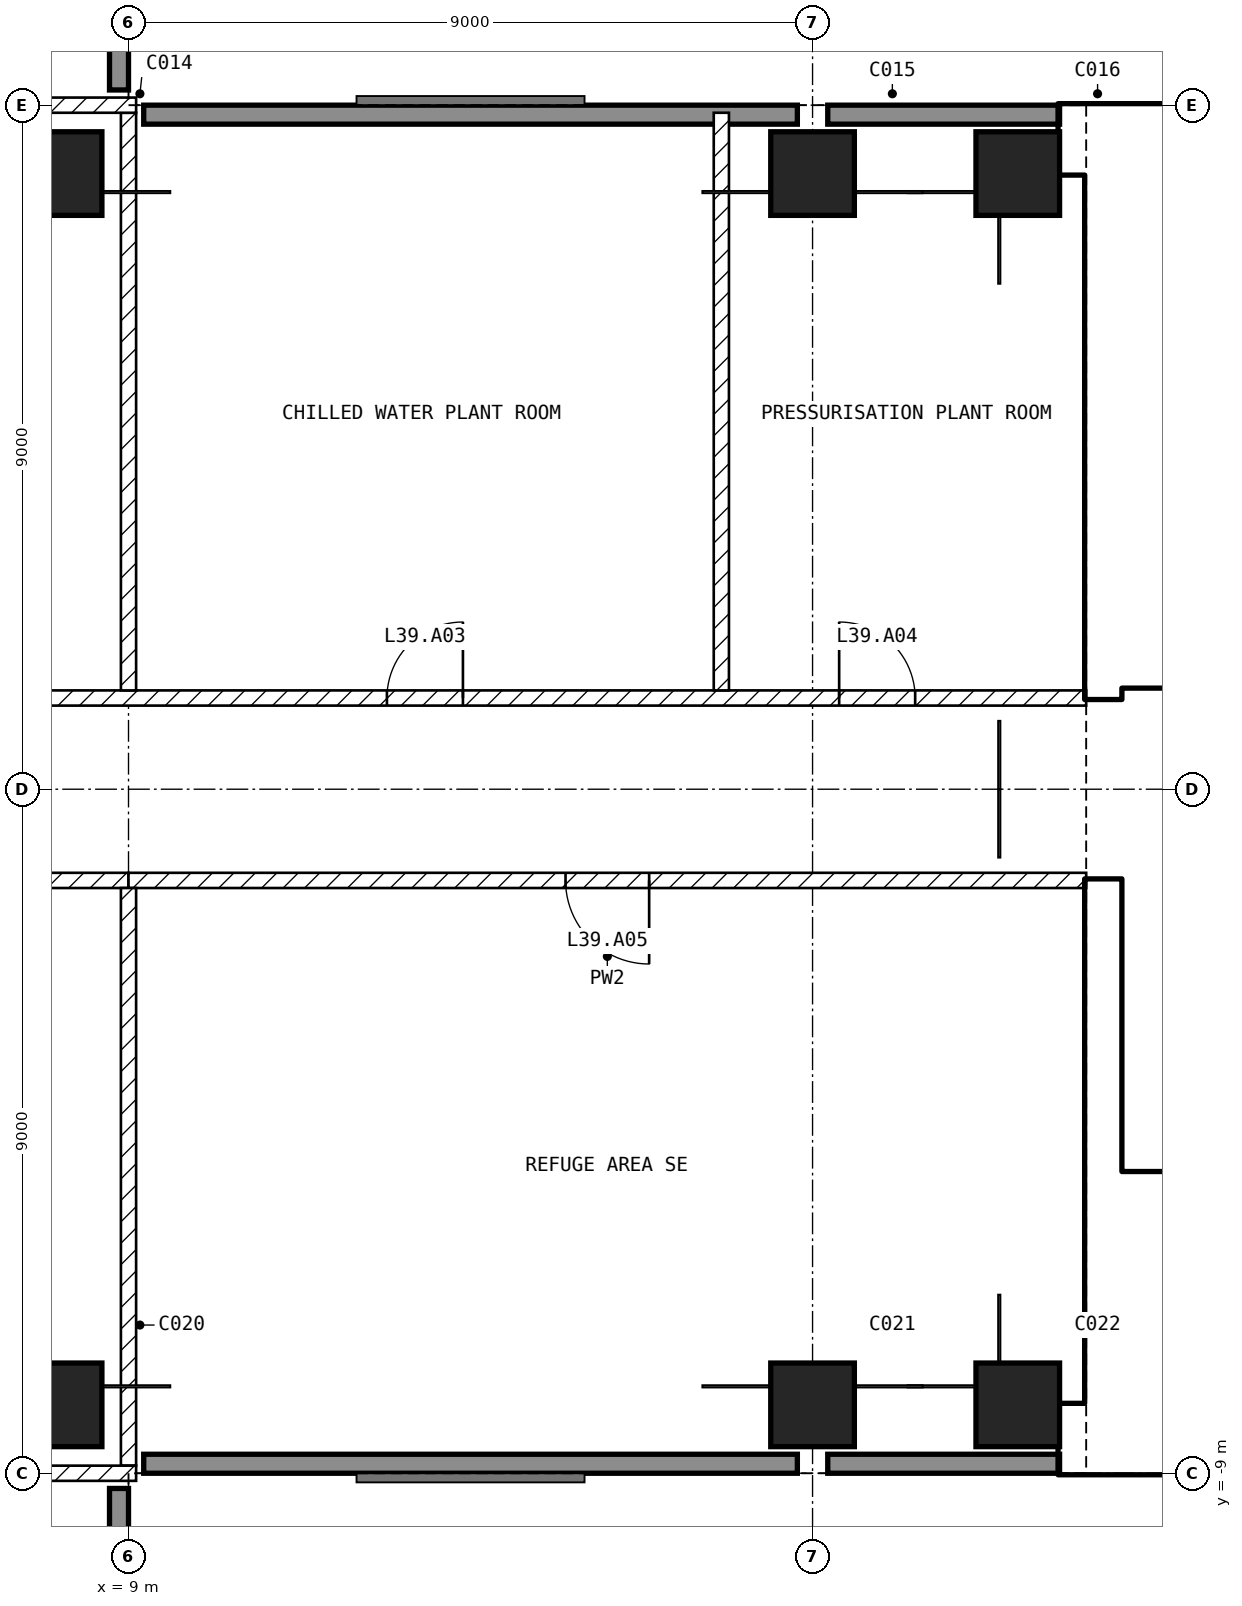
"""IFC4 building model, lengths in metres.
Left out: names, types, materials, properties, quantities, classifications, styles, units other than length and angle.
Written with IfcOpenShell. Run it as: python <this file> out.ifc"""

import sys

from ifc_helpers import new_model, si_unit, direction, frame, frame_2d, origin, origin_2d, place, context, subcontext, project, spatial, rectangle, extrude, element, fill, save


model = new_model("IFC4")
c1 = context("Model", 3, precision=1e-05, world=origin(), true_north=direction((0.0, 1.0)))
c2 = subcontext(c1, "Body", "Model", "MODEL_VIEW")
j1 = project(units=[si_unit("LENGTHUNIT", "METRE"), si_unit("PLANEANGLEUNIT", "RADIAN")], contexts=[c1])
p1 = place(None, origin())
s1 = spatial("IfcSite", under=j1, at=p1, CompositionType="ELEMENT")
p2 = place(p1, origin())
s2 = spatial("IfcBuilding", under=s1, at=p2, CompositionType="ELEMENT")
p3 = place(p2, frame((0.0, 0.0, 162.1)))
s3 = spatial("IfcBuildingStorey", under=s2, at=p3, CompositionType="ELEMENT", Elevation=162.1)
for number, where, z_axis, x_axis in (
    (1, (8.1, -8.1, -0.45), (0.0, 0.0, 1.0), (1.0, 0.0, 0.0)),
    (2, (8.1, 8.1, -0.45), (0.0, 0.0, 1.0), (1.0, 0.0, 0.0)),
    (3, (18.0, -8.1, -0.45), (0.0, 0.0, 1.0), (1.0, 0.0, 0.0)),
    (4, (18.0, 8.1, -0.45), (0.0, 0.0, 1.0), (1.0, 0.0, 0.0)),
    (5, (20.7, -8.1, -0.45), (0.0, 0.0, 1.0), (1.0, 0.0, 0.0)),
    (6, (20.7, 8.1, -0.45), (0.0, 0.0, 1.0), (1.0, 0.0, 0.0)),
):
    element("IfcColumn", number, at=place(p3, frame(where, z_axis=z_axis, x_axis=x_axis)), inside=s3, PredefinedType="COLUMN", context=c2, shape_type="SweptSolid", body=[
        extrude(rectangle(XDim=1.1, YDim=1.1, at=origin_2d()), origin(), (0.0, 0.0, 1.0), 4.7),
    ])
p4 = place(p3, frame((21.25, 8.875, 0.0), z_axis=(0.0, 0.0, 1.0), x_axis=(-1.0, 0.0, 0.0)))
e7 = element("IfcWall", 7, at=p4, inside=s3, PredefinedType="SOLIDWALL", context=c2, shape_type="SweptSolid", body=[
    extrude(rectangle(XDim=3.05, YDim=0.25, at=frame_2d((1.525, 0.0))), origin(), (0.0, 0.0, 1.0), 4.25),
])
p5 = place(p3, frame((17.8, 8.875, 0.0), z_axis=(0.0, 0.0, 1.0), x_axis=(-1.0, 0.0, 0.0)))
e8 = element("IfcWall", 8, at=p5, inside=s3, PredefinedType="SOLIDWALL", context=c2, shape_type="SweptSolid", body=[
    extrude(rectangle(XDim=8.6, YDim=0.25, at=frame_2d((4.3, 0.0))), origin(), (0.0, 0.0, 1.0), 4.25),
])
p6 = place(p3, frame((8.875, 9.2, 0.0), z_axis=(0.0, 0.0, 1.0), x_axis=(0.0, 1.0, 0.0)))
e9 = element("IfcWall", 9, at=p6, inside=s3, PredefinedType="SOLIDWALL", context=c2, shape_type="SweptSolid", body=[
    extrude(rectangle(XDim=8.6, YDim=0.25, at=frame_2d((4.3, 0.0))), origin(), (0.0, 0.0, 1.0), 4.25),
])
p7 = place(p6, frame((2.8, 0.0, 1.0)))
e10 = element("IfcOpeningElement", 10, at=p7, cuts=e9, PredefinedType="OPENING", context=c2, shape_type="SweptSolid", body=[
    extrude(rectangle(XDim=3.0, YDim=2.4, at=frame_2d((1.5, 1.2))), frame((0.0, 0.135, 0.0), z_axis=(0.0, -1.0, 0.0), x_axis=(1.0, 0.0, 0.0)), (0.0, 0.0, 1.0), 0.27),
])
for number, where, z_axis, x_axis in (
    (11, (8.875, -17.8, 0.0), (0.0, 0.0, 1.0), (0.0, 1.0, 0.0)),
    (12, (9.2, -8.875, 0.0), (0.0, 0.0, 1.0), (1.0, 0.0, 0.0)),
):
    element("IfcWall", number, at=place(p3, frame(where, z_axis=z_axis, x_axis=x_axis)), inside=s3, PredefinedType="SOLIDWALL", context=c2, shape_type="SweptSolid", body=[
        extrude(rectangle(XDim=8.6, YDim=0.25, at=frame_2d((4.3, 0.0))), origin(), (0.0, 0.0, 1.0), 4.25),
    ])
p8 = place(p3, frame((18.2, -8.875, 0.0), z_axis=(0.0, 0.0, 1.0), x_axis=(1.0, 0.0, 0.0)))
e13 = element("IfcWall", 13, at=p8, inside=s3, PredefinedType="SOLIDWALL", context=c2, shape_type="SweptSolid", body=[
    extrude(rectangle(XDim=3.05, YDim=0.25, at=frame_2d((1.525, 0.0))), origin(), (0.0, 0.0, 1.0), 4.25),
])
p9 = place(p3, frame((21.25, -8.55, 0.0), z_axis=(0.0, 0.0, 1.0), x_axis=(1.0, 0.0, 0.0)))
e14 = element("IfcWall", 14, at=p9, inside=s3, PredefinedType="SHEAR", context=c2, shape_type="SweptSolid", body=[
    extrude(rectangle(XDim=8.95, YDim=0.9, at=frame_2d((4.475, 0.0))), origin(), (0.0, 0.0, 1.0), 4.25),
])
p10 = place(p3, frame((21.25, 8.55, 0.0), z_axis=(0.0, 0.0, 1.0), x_axis=(1.0, 0.0, 0.0)))
e15 = element("IfcWall", 15, at=p10, inside=s3, PredefinedType="SHEAR", context=c2, shape_type="SweptSolid", body=[
    extrude(rectangle(XDim=8.35, YDim=0.9, at=frame_2d((4.175, 0.0))), origin(), (0.0, 0.0, 1.0), 4.25),
])
for number, where, z_axis, x_axis in (
    (16, (21.825, -8.1, 0.0), (0.0, 0.0, 1.0), (0.0, 1.0, 0.0)),
    (17, (21.825, 1.2, 0.0), (0.0, 0.0, 1.0), (0.0, 1.0, 0.0)),
):
    element("IfcWall", number, at=place(p3, frame(where, z_axis=z_axis, x_axis=x_axis)), inside=s3, PredefinedType="SHEAR", context=c2, shape_type="SweptSolid", body=[
        extrude(rectangle(XDim=6.9, YDim=0.45, at=frame_2d((3.45, 0.0))), origin(), (0.0, 0.0, 1.0), 4.25),
    ])
p11 = place(p3, frame((22.05, 1.45, 0.0), z_axis=(0.0, 0.0, 1.0), x_axis=(1.0, 0.0, 0.0)))
e18 = element("IfcWall", 18, at=p11, inside=s3, PredefinedType="SOLIDWALL", context=c2, shape_type="SweptSolid", body=[
    extrude(rectangle(XDim=11.15, YDim=0.2, at=frame_2d((5.575, 0.0))), origin(), (0.0, 0.0, 1.0), 4.25),
])
p12 = place(p11, frame((0.75, 0.0, 0.0)))
e19 = element("IfcOpeningElement", 19, at=p12, cuts=e18, PredefinedType="OPENING", context=c2, shape_type="SweptSolid", body=[
    extrude(rectangle(XDim=1.0, YDim=2.1, at=frame_2d((0.5, 1.05))), frame((0.0, 0.11, 0.0), z_axis=(0.0, -1.0, 0.0), x_axis=(1.0, 0.0, 0.0)), (0.0, 0.0, 1.0), 0.22),
])
p13 = place(p11, frame((3.25, 0.0, 0.0)))
e20 = element("IfcOpeningElement", 20, at=p13, cuts=e18, PredefinedType="OPENING", context=c2, shape_type="SweptSolid", body=[
    extrude(rectangle(XDim=1.0, YDim=2.1, at=frame_2d((0.5, 1.05))), frame((0.0, 0.11, 0.0), z_axis=(0.0, -1.0, 0.0), x_axis=(1.0, 0.0, 0.0)), (0.0, 0.0, 1.0), 0.22),
])
p14 = place(p11, frame((9.15, 0.0, 0.0)))
e21 = element("IfcOpeningElement", 21, at=p14, cuts=e18, PredefinedType="OPENING", context=c2, shape_type="SweptSolid", body=[
    extrude(rectangle(XDim=0.9, YDim=2.1, at=frame_2d((0.45, 1.05))), frame((0.0, 0.11, 0.0), z_axis=(0.0, -1.0, 0.0), x_axis=(1.0, 0.0, 0.0)), (0.0, 0.0, 1.0), 0.22),
])
p15 = place(p3, frame((22.05, 5.15, 0.0), z_axis=(0.0, 0.0, 1.0), x_axis=(1.0, 0.0, 0.0)))
e22 = element("IfcWall", 22, at=p15, inside=s3, PredefinedType="SOLIDWALL", context=c2, shape_type="SweptSolid", body=[
    extrude(rectangle(XDim=6.3, YDim=0.2, at=frame_2d((3.15, 0.0))), origin(), (0.0, 0.0, 1.0), 4.25),
])
p16 = place(p15, frame((0.2, 0.0, 0.0)))
e23 = element("IfcOpeningElement", 23, at=p16, cuts=e22, PredefinedType="OPENING", context=c2, shape_type="SweptSolid", body=[
    extrude(rectangle(XDim=1.0, YDim=2.1, at=frame_2d((0.5, 1.05))), frame((0.0, 0.11, 0.0), z_axis=(0.0, -1.0, 0.0), x_axis=(1.0, 0.0, 0.0)), (0.0, 0.0, 1.0), 0.22),
])
p17 = place(p3, frame((22.05, -5.15, 0.0), z_axis=(0.0, 0.0, 1.0), x_axis=(1.0, 0.0, 0.0)))
e24 = element("IfcWall", 24, at=p17, inside=s3, PredefinedType="SOLIDWALL", context=c2, shape_type="SweptSolid", body=[
    extrude(rectangle(XDim=6.3, YDim=0.2, at=frame_2d((3.15, 0.0))), origin(), (0.0, 0.0, 1.0), 4.25),
])
p18 = place(p17, frame((0.2, 0.0, 0.0)))
e25 = element("IfcOpeningElement", 25, at=p18, cuts=e24, PredefinedType="OPENING", context=c2, shape_type="SweptSolid", body=[
    extrude(rectangle(XDim=1.0, YDim=2.1, at=frame_2d((0.5, 1.05))), frame((0.0, 0.11, 0.0), z_axis=(0.0, -1.0, 0.0), x_axis=(1.0, 0.0, 0.0)), (0.0, 0.0, 1.0), 0.22),
])
p19 = place(p3, frame((-9.0, 1.2, 0.0), z_axis=(0.0, 0.0, 1.0), x_axis=(1.0, 0.0, 0.0)))
e26 = element("IfcWall", 26, at=p19, inside=s3, PredefinedType="PARTITIONING", context=c2, shape_type="SweptSolid", body=[
    extrude(rectangle(XDim=30.6, YDim=0.2, at=frame_2d((15.3, 0.0))), origin(), (0.0, 0.0, 1.0), 4.25),
])
p20 = place(p19, frame((8.5, 0.0, 0.0)))
e27 = element("IfcOpeningElement", 27, at=p20, cuts=e26, PredefinedType="OPENING", context=c2, shape_type="SweptSolid", body=[
    extrude(rectangle(XDim=1.0, YDim=2.1, at=frame_2d((0.5, 1.05))), frame((0.0, 0.11, 0.0), z_axis=(0.0, -1.0, 0.0), x_axis=(1.0, 0.0, 0.0)), (0.0, 0.0, 1.0), 0.22),
])
p21 = place(p19, frame((21.4, 0.0, 0.0)))
e28 = element("IfcOpeningElement", 28, at=p21, cuts=e26, PredefinedType="OPENING", context=c2, shape_type="SweptSolid", body=[
    extrude(rectangle(XDim=1.0, YDim=2.1, at=frame_2d((0.5, 1.05))), frame((0.0, 0.11, 0.0), z_axis=(0.0, -1.0, 0.0), x_axis=(1.0, 0.0, 0.0)), (0.0, 0.0, 1.0), 0.22),
])
p22 = place(p19, frame((27.35, 0.0, 0.0)))
e29 = element("IfcOpeningElement", 29, at=p22, cuts=e26, PredefinedType="OPENING", context=c2, shape_type="SweptSolid", body=[
    extrude(rectangle(XDim=1.0, YDim=2.1, at=frame_2d((0.5, 1.05))), frame((0.0, 0.11, 0.0), z_axis=(0.0, -1.0, 0.0), x_axis=(1.0, 0.0, 0.0)), (0.0, 0.0, 1.0), 0.22),
])
p23 = place(p3, frame((9.0, -1.2, 0.0), z_axis=(0.0, 0.0, 1.0), x_axis=(-1.0, 0.0, 0.0)))
e30 = element("IfcWall", 30, at=p23, inside=s3, PredefinedType="PARTITIONING", context=c2, shape_type="SweptSolid", body=[
    extrude(rectangle(XDim=30.6, YDim=0.2, at=frame_2d((15.3, 0.0))), origin(), (0.0, 0.0, 1.0), 4.25),
])
p24 = place(p23, frame((8.5, 0.0, 0.0)))
e31 = element("IfcOpeningElement", 31, at=p24, cuts=e30, PredefinedType="OPENING", context=c2, shape_type="SweptSolid", body=[
    extrude(rectangle(XDim=1.0, YDim=2.1, at=frame_2d((0.5, 1.05))), frame((0.0, 0.11, 0.0), z_axis=(0.0, -1.0, 0.0), x_axis=(1.0, 0.0, 0.0)), (0.0, 0.0, 1.0), 0.22),
])
p25 = place(p23, frame((21.4, 0.0, 0.0)))
e32 = element("IfcOpeningElement", 32, at=p25, cuts=e30, PredefinedType="OPENING", context=c2, shape_type="SweptSolid", body=[
    extrude(rectangle(XDim=1.0, YDim=2.1, at=frame_2d((0.5, 1.05))), frame((0.0, 0.11, 0.0), z_axis=(0.0, -1.0, 0.0), x_axis=(1.0, 0.0, 0.0)), (0.0, 0.0, 1.0), 0.22),
])
p26 = place(p23, frame((27.35, 0.0, 0.0)))
e33 = element("IfcOpeningElement", 33, at=p26, cuts=e30, PredefinedType="OPENING", context=c2, shape_type="SweptSolid", body=[
    extrude(rectangle(XDim=1.0, YDim=2.1, at=frame_2d((0.5, 1.05))), frame((0.0, 0.11, 0.0), z_axis=(0.0, -1.0, 0.0), x_axis=(1.0, 0.0, 0.0)), (0.0, 0.0, 1.0), 0.22),
])
p27 = place(p3, frame((21.6, -1.2, 0.0), z_axis=(0.0, 0.0, 1.0), x_axis=(-1.0, 0.0, 0.0)))
e34 = element("IfcWall", 34, at=p27, inside=s3, PredefinedType="PARTITIONING", context=c2, shape_type="SweptSolid", body=[
    extrude(rectangle(XDim=12.6, YDim=0.2, at=frame_2d((6.3, 0.0))), origin(), (0.0, 0.0, 1.0), 4.25),
])
p28 = place(p27, frame((5.75, 0.0, 0.0)))
e35 = element("IfcOpeningElement", 35, at=p28, cuts=e34, PredefinedType="OPENING", context=c2, shape_type="SweptSolid", body=[
    extrude(rectangle(XDim=1.1, YDim=2.1, at=frame_2d((0.55, 1.05))), frame((0.0, 0.11, 0.0), z_axis=(0.0, -1.0, 0.0), x_axis=(1.0, 0.0, 0.0)), (0.0, 0.0, 1.0), 0.22),
])
p29 = place(p3, frame((9.0, 8.9, 0.0), z_axis=(0.0, 0.0, 1.0), x_axis=(0.0, -1.0, 0.0)))
e36 = element("IfcWall", 36, at=p29, inside=s3, PredefinedType="PARTITIONING", context=c2, shape_type="SweptSolid", body=[
    extrude(rectangle(XDim=7.6, YDim=0.2, at=frame_2d((3.8, 0.0))), origin(), (0.0, 0.0, 1.0), 4.25),
])
p30 = place(p3, frame((-9.1, 9.0, 0.0), z_axis=(0.0, 0.0, 1.0), x_axis=(1.0, 0.0, 0.0)))
e37 = element("IfcWall", 37, at=p30, inside=s3, PredefinedType="PARTITIONING", context=c2, shape_type="SweptSolid", body=[
    extrude(rectangle(XDim=18.2, YDim=0.2, at=frame_2d((9.1, 0.0))), origin(), (0.0, 0.0, 1.0), 4.25),
])
p31 = place(p30, frame((8.6, 0.0, 0.0)))
e38 = element("IfcOpeningElement", 38, at=p31, cuts=e37, PredefinedType="OPENING", context=c2, shape_type="SweptSolid", body=[
    extrude(rectangle(XDim=1.0, YDim=2.1, at=frame_2d((0.5, 1.05))), frame((0.0, 0.11, 0.0), z_axis=(0.0, -1.0, 0.0), x_axis=(1.0, 0.0, 0.0)), (0.0, 0.0, 1.0), 0.22),
])
p32 = place(p3, frame((9.0, -1.3, 0.0), z_axis=(0.0, 0.0, 1.0), x_axis=(0.0, -1.0, 0.0)))
e39 = element("IfcWall", 39, at=p32, inside=s3, PredefinedType="PARTITIONING", context=c2, shape_type="SweptSolid", body=[
    extrude(rectangle(XDim=7.6, YDim=0.2, at=frame_2d((3.8, 0.0))), origin(), (0.0, 0.0, 1.0), 4.25),
])
p33 = place(p3, frame((9.1, -9.0, 0.0), z_axis=(0.0, 0.0, 1.0), x_axis=(-1.0, 0.0, 0.0)))
e40 = element("IfcWall", 40, at=p33, inside=s3, PredefinedType="PARTITIONING", context=c2, shape_type="SweptSolid", body=[
    extrude(rectangle(XDim=18.2, YDim=0.2, at=frame_2d((9.1, 0.0))), origin(), (0.0, 0.0, 1.0), 4.25),
])
p34 = place(p33, frame((8.6, 0.0, 0.0)))
e41 = element("IfcOpeningElement", 41, at=p34, cuts=e40, PredefinedType="OPENING", context=c2, shape_type="SweptSolid", body=[
    extrude(rectangle(XDim=1.0, YDim=2.1, at=frame_2d((0.5, 1.05))), frame((0.0, 0.11, 0.0), z_axis=(0.0, -1.0, 0.0), x_axis=(1.0, 0.0, 0.0)), (0.0, 0.0, 1.0), 0.22),
])
p35 = place(p3, frame((16.8, 8.9, 0.0), z_axis=(0.0, 0.0, 1.0), x_axis=(0.0, -1.0, 0.0)))
e42 = element("IfcWall", 42, at=p35, inside=s3, PredefinedType="PARTITIONING", context=c2, shape_type="SweptSolid", body=[
    extrude(rectangle(XDim=7.6, YDim=0.2, at=frame_2d((3.8, 0.0))), origin(), (0.0, 0.0, 1.0), 4.25),
])
p36 = place(p18, origin())
e43 = element("IfcDoor", 43, at=p36, inside=s3, OperationType="SINGLE_SWING_LEFT", PredefinedType="DOOR", context=c2, shape_type="SweptSolid", body=[
    extrude(rectangle(XDim=1.0, YDim=2.1, at=frame_2d((0.5, 1.05))), frame((0.0, 0.025, 0.0), z_axis=(0.0, -1.0, 0.0), x_axis=(1.0, 0.0, 0.0)), (0.0, 0.0, 1.0), 0.05),
])
fill(e25, e43)
p37 = place(p16, origin())
e44 = element("IfcDoor", 44, at=p37, inside=s3, OperationType="SINGLE_SWING_LEFT", PredefinedType="DOOR", context=c2, shape_type="SweptSolid", body=[
    extrude(rectangle(XDim=1.0, YDim=2.1, at=frame_2d((0.5, 1.05))), frame((0.0, 0.025, 0.0), z_axis=(0.0, -1.0, 0.0), x_axis=(1.0, 0.0, 0.0)), (0.0, 0.0, 1.0), 0.05),
])
fill(e23, e44)
p38 = place(p21, origin())
e45 = element("IfcDoor", 45, at=p38, inside=s3, OperationType="SINGLE_SWING_RIGHT", PredefinedType="DOOR", context=c2, shape_type="SweptSolid", body=[
    extrude(rectangle(XDim=1.0, YDim=2.1, at=frame_2d((0.5, 1.05))), frame((0.0, 0.025, 0.0), z_axis=(0.0, -1.0, 0.0), x_axis=(1.0, 0.0, 0.0)), (0.0, 0.0, 1.0), 0.05),
])
fill(e28, e45)
p39 = place(p22, origin())
e46 = element("IfcDoor", 46, at=p39, inside=s3, OperationType="SINGLE_SWING_LEFT", PredefinedType="DOOR", context=c2, shape_type="SweptSolid", body=[
    extrude(rectangle(XDim=1.0, YDim=2.1, at=frame_2d((0.5, 1.05))), frame((0.0, 0.025, 0.0), z_axis=(0.0, -1.0, 0.0), x_axis=(1.0, 0.0, 0.0)), (0.0, 0.0, 1.0), 0.05),
])
fill(e29, e46)
p40 = place(p28, origin())
e47 = element("IfcDoor", 47, at=p40, inside=s3, OperationType="SINGLE_SWING_LEFT", PredefinedType="DOOR", context=c2, shape_type="SweptSolid", body=[
    extrude(rectangle(XDim=1.1, YDim=2.1, at=frame_2d((0.55, 1.05))), frame((0.0, 0.025, 0.0), z_axis=(0.0, -1.0, 0.0), x_axis=(1.0, 0.0, 0.0)), (0.0, 0.0, 1.0), 0.05),
])
fill(e35, e47)
save(model, sys.argv[1])
